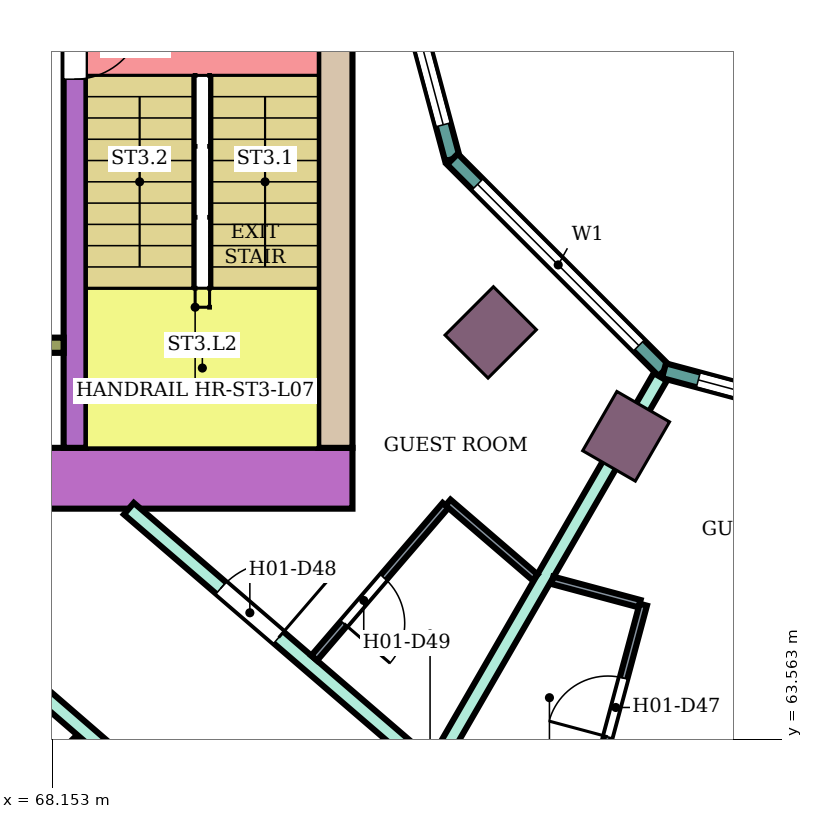
"""IFC4 building model, lengths in metres.
Left out: names, types, materials, properties, quantities, classifications, styles, units other than length and angle.
Written with IfcOpenShell. Run it as: python <this file> out.ifc"""

import sys

from ifc_helpers import new_model, si_unit, direction, frame, frame_2d, origin, origin_2d, place, context, subcontext, project, spatial, rectangle, extrude, element, fill, save


model = new_model("IFC4")
c1 = context("Model", 3, precision=1e-05, world=origin(), true_north=direction((0.0, 1.0)))
c2 = subcontext(c1, "Body", "Model", "MODEL_VIEW")
j1 = project(units=[si_unit("LENGTHUNIT", "METRE"), si_unit("PLANEANGLEUNIT", "RADIAN")], contexts=[c1])
p1 = place(None, origin())
s1 = spatial("IfcSite", under=j1, at=p1, CompositionType="ELEMENT")
p2 = place(p1, origin())
s2 = spatial("IfcBuilding", under=s1, at=p2, CompositionType="ELEMENT")
p3 = place(p2, frame((0.0, 0.0, 36.4)))
s3 = spatial("IfcBuildingStorey", under=s2, at=p3, CompositionType="ELEMENT", Elevation=36.4)
for number, where, z_axis, x_axis in (
    (1, (73.919, 68.919, 0.0), (0.0, 0.0, 1.0), (-0.707, -0.707, 0.0)),
    (2, (75.7, 67.552, 0.0), (0.0, 0.0, 1.0), (-0.5, -0.866, 0.0)),
):
    element("IfcColumn", number, at=place(p3, frame(where, z_axis=z_axis, x_axis=x_axis)), inside=s3, PredefinedType="COLUMN", context=c2, shape_type="SweptSolid", body=[
        extrude(rectangle(XDim=0.9, YDim=0.8, at=origin_2d()), origin(), (0.0, 0.0, 1.0), 3.8),
    ])
p4 = place(p3, frame((72.1, 67.0, 0.0), z_axis=(0.0, 0.0, 1.0), x_axis=(-1.0, 0.0, 0.0)))
e3 = element("IfcWall", 3, at=p4, inside=s3, PredefinedType="SHEAR", context=c2, shape_type="SweptSolid", body=[
    extrude(rectangle(XDim=14.7, YDim=0.8, at=frame_2d((7.35, 0.0))), origin(), (0.0, 0.0, 1.0), 3.48),
])
p5 = place(p4, frame((4.2, 0.0, 0.0)))
e4 = element("IfcOpeningElement", 4, at=p5, cuts=e3, PredefinedType="OPENING", context=c2, shape_type="SweptSolid", body=[
    extrude(rectangle(XDim=2.4, YDim=2.4, at=frame_2d((1.2, 1.2))), frame((0.0, 0.41, 0.0), z_axis=(0.0, -1.0, 0.0), x_axis=(1.0, 0.0, 0.0)), (0.0, 0.0, 1.0), 0.82),
])
p6 = place(p3, frame((71.875, 75.0, 0.0), z_axis=(0.0, 0.0, 1.0), x_axis=(0.0, -1.0, 0.0)))
e5 = element("IfcWall", 5, at=p6, inside=s3, PredefinedType="SHEAR", context=c2, shape_type="SweptSolid", body=[
    extrude(rectangle(XDim=7.6, YDim=0.45, at=frame_2d((3.8, 0.0))), origin(), (0.0, 0.0, 1.0), 3.48),
])
p7 = place(p3, frame((68.45, 75.0, 0.0), z_axis=(0.0, 0.0, 1.0), x_axis=(0.0, -1.0, 0.0)))
e6 = element("IfcWall", 6, at=p7, inside=s3, PredefinedType="SHEAR", context=c2, shape_type="SweptSolid", body=[
    extrude(rectangle(XDim=7.6, YDim=0.3, at=frame_2d((3.8, 0.0))), origin(), (0.0, 0.0, 1.0), 3.48),
])
p8 = place(p7, frame((1.85, 0.0, 0.0)))
e7 = element("IfcOpeningElement", 7, at=p8, cuts=e6, PredefinedType="OPENING", context=c2, shape_type="SweptSolid", body=[
    extrude(rectangle(XDim=0.9, YDim=2.1, at=frame_2d((0.45, 1.05))), frame((0.0, 0.16, 0.0), z_axis=(0.0, -1.0, 0.0), x_axis=(1.0, 0.0, 0.0)), (0.0, 0.0, 1.0), 0.32),
])
p9 = place(p3, frame((68.3, 68.75, 0.0), z_axis=(0.0, 0.0, 1.0), x_axis=(-1.0, 0.0, 0.0)))
e8 = element("IfcWall", 8, at=p9, inside=s3, PredefinedType="SHEAR", context=c2, shape_type="SweptSolid", body=[
    extrude(rectangle(XDim=4.65, YDim=0.2, at=frame_2d((2.325, 0.0))), origin(), (0.0, 0.0, 1.0), 3.48),
])
p10 = place(p3, frame((72.396, 75.0, 0.0), z_axis=(0.0, 0.0, 1.0), x_axis=(0.258789828301, -0.965933654434, 0.0)))
e9 = element("IfcWall", 9, at=p10, inside=s3, PredefinedType="NOTDEFINED", context=c2, shape_type="SweptSolid", body=[
    extrude(rectangle(XDim=3.936, YDim=0.2, at=frame_2d((1.968, 0.0))), origin(), (0.0, 0.0, 1.0), 3.8),
])
p11 = place(p10, frame((0.468, 0.0, 0.9)))
e10 = element("IfcOpeningElement", 10, at=p11, cuts=e9, PredefinedType="OPENING", context=c2, shape_type="SweptSolid", body=[
    extrude(rectangle(XDim=3.0, YDim=2.3, at=frame_2d((1.5, 1.15))), frame((0.0, 0.11, 0.0), z_axis=(0.0, -1.0, 0.0), x_axis=(1.0, 0.0, 0.0)), (0.0, 0.0, 1.0), 0.22),
])
p12 = place(p3, frame((73.415, 71.198, 0.0), z_axis=(0.0, 0.0, 1.0), x_axis=(0.707106781187, -0.707106781187, 0.0)))
e11 = element("IfcWall", 11, at=p12, inside=s3, PredefinedType="NOTDEFINED", context=c2, shape_type="SweptSolid", body=[
    extrude(rectangle(XDim=3.936, YDim=0.2, at=frame_2d((1.968, 0.0))), origin(), (0.0, 0.0, 1.0), 3.8),
])
p13 = place(p12, frame((0.468, 0.0, 0.9)))
e12 = element("IfcOpeningElement", 12, at=p13, cuts=e11, PredefinedType="OPENING", context=c2, shape_type="SweptSolid", body=[
    extrude(rectangle(XDim=3.0, YDim=2.3, at=frame_2d((1.5, 1.15))), frame((0.0, 0.11, 0.0), z_axis=(0.0, -1.0, 0.0), x_axis=(1.0, 0.0, 0.0)), (0.0, 0.0, 1.0), 0.22),
])
p14 = place(p3, frame((76.198, 68.415, 0.0), z_axis=(0.0, 0.0, 1.0), x_axis=(0.965933654434, -0.258789828301, 0.0)))
e13 = element("IfcWall", 13, at=p14, inside=s3, PredefinedType="NOTDEFINED", context=c2, shape_type="SweptSolid", body=[
    extrude(rectangle(XDim=3.936, YDim=0.2, at=frame_2d((1.968, 0.0))), origin(), (0.0, 0.0, 1.0), 3.8),
])
p15 = place(p14, frame((0.468, 0.0, 0.9)))
e14 = element("IfcOpeningElement", 14, at=p15, cuts=e13, PredefinedType="OPENING", context=c2, shape_type="SweptSolid", body=[
    extrude(rectangle(XDim=3.0, YDim=2.3, at=frame_2d((1.5, 1.15))), frame((0.0, 0.11, 0.0), z_axis=(0.0, -1.0, 0.0), x_axis=(1.0, 0.0, 0.0)), (0.0, 0.0, 1.0), 0.22),
])
p16 = place(p3, frame((63.592, 58.599, 0.0), z_axis=(0.0, 0.0, 1.0), x_axis=(0.707228748718, 0.706984792613, 0.0)))
e15 = element("IfcWall", 15, at=p16, inside=s3, PredefinedType="PARTITIONING", context=c2, shape_type="SweptSolid", body=[
    extrude(rectangle(XDim=7.005, YDim=0.2, at=frame_2d((3.503, 0.0))), origin(), (0.0, 0.0, 1.0), 3.35),
])
p17 = place(p3, frame((67.078, 64.968, 0.0), z_axis=(0.0, 0.0, 1.0), x_axis=(0.756371089567, -0.654142778656, 0.0)))
e16 = element("IfcWall", 16, at=p17, inside=s3, PredefinedType="PARTITIONING", context=c2, shape_type="SweptSolid", body=[
    extrude(rectangle(XDim=6.185, YDim=0.2, at=frame_2d((3.093, 0.0))), origin(), (0.0, 0.0, 1.0), 3.35),
])
p18 = place(p17, frame((4.755, 0.0, 0.0)))
e17 = element("IfcOpeningElement", 17, at=p18, cuts=e16, PredefinedType="OPENING", context=c2, shape_type="SweptSolid", body=[
    extrude(rectangle(XDim=1.0, YDim=2.1, at=frame_2d((0.5, 1.05))), frame((0.0, 0.11, 0.0), z_axis=(0.0, -1.0, 0.0), x_axis=(1.0, 0.0, 0.0)), (0.0, 0.0, 1.0), 0.22),
])
p19 = place(p3, frame((69.158, 66.6, 0.0), z_axis=(0.0, 0.0, 1.0), x_axis=(0.757976058094, -0.652282373943, 0.0)))
e18 = element("IfcWall", 18, at=p19, inside=s3, PredefinedType="PARTITIONING", context=c2, shape_type="SweptSolid", body=[
    extrude(rectangle(XDim=5.16, YDim=0.2, at=frame_2d((2.58, 0.0))), origin(), (0.0, 0.0, 1.0), 3.35),
])
p20 = place(p19, frame((1.6, 0.0, 0.0)))
e19 = element("IfcOpeningElement", 19, at=p20, cuts=e18, PredefinedType="OPENING", context=c2, shape_type="SweptSolid", body=[
    extrude(rectangle(XDim=1.0, YDim=2.1, at=frame_2d((0.5, 1.05))), frame((0.0, 0.11, 0.0), z_axis=(0.0, -1.0, 0.0), x_axis=(1.0, 0.0, 0.0)), (0.0, 0.0, 1.0), 0.22),
])
p21 = place(p3, frame((73.171, 63.177, 0.0), z_axis=(0.0, 0.0, 1.0), x_axis=(0.500257106344, 0.865876912472, 0.0)))
e20 = element("IfcWall", 20, at=p21, inside=s3, PredefinedType="PARTITIONING", context=c2, shape_type="SweptSolid", body=[
    extrude(rectangle(XDim=5.955, YDim=0.2, at=frame_2d((2.978, 0.0))), origin(), (0.0, 0.0, 1.0), 3.35),
])
p22 = place(p3, frame((71.596, 64.635, 0.0), z_axis=(0.0, 0.0, 1.0), x_axis=(0.652285007511, 0.757973791748, 0.0)))
e21 = element("IfcWall", 21, at=p22, inside=s3, PredefinedType="PARTITIONING", context=c2, shape_type="SweptSolid", body=[
    extrude(rectangle(XDim=2.65, YDim=0.1, at=frame_2d((1.325, 0.0))), origin(), (0.0, 0.0, 1.0), 3.35),
])
p23 = place(p22, frame((0.6, 0.0, 0.0)))
e22 = element("IfcOpeningElement", 22, at=p23, cuts=e21, PredefinedType="OPENING", context=c2, shape_type="SweptSolid", body=[
    extrude(rectangle(XDim=0.8, YDim=2.1, at=frame_2d((0.4, 1.05))), frame((0.0, 0.06, 0.0), z_axis=(0.0, -1.0, 0.0), x_axis=(1.0, 0.0, 0.0)), (0.0, 0.0, 1.0), 0.12),
])
p24 = place(p3, frame((73.357, 66.681, 0.0), z_axis=(0.0, 0.0, 1.0), x_axis=(0.758263469747, -0.651948242154, 0.0)))
e23 = element("IfcWall", 23, at=p24, inside=s3, PredefinedType="PARTITIONING", context=c2, shape_type="SweptSolid", body=[
    extrude(rectangle(XDim=1.511, YDim=0.1, at=frame_2d((0.755, 0.0))), origin(), (0.0, 0.0, 1.0), 3.35),
])
p25 = place(p3, frame((74.729, 65.657, 0.0), z_axis=(0.0, 0.0, 1.0), x_axis=(0.965948051503, -0.258736085224, 0.0)))
e24 = element("IfcWall", 24, at=p25, inside=s3, PredefinedType="PARTITIONING", context=c2, shape_type="SweptSolid", body=[
    extrude(rectangle(XDim=1.189, YDim=0.1, at=frame_2d((0.594, 0.0))), origin(), (0.0, 0.0, 1.0), 3.35),
])
p26 = place(p3, frame((75.227, 62.729, 0.0), z_axis=(0.0, 0.0, 1.0), x_axis=(0.258945475746, 0.965891940432, 0.0)))
e25 = element("IfcWall", 25, at=p26, inside=s3, PredefinedType="PARTITIONING", context=c2, shape_type="SweptSolid", body=[
    extrude(rectangle(XDim=2.7, YDim=0.1, at=frame_2d((1.35, 0.0))), origin(), (0.0, 0.0, 1.0), 3.35),
])
p27 = place(p26, frame((0.9, 0.0, 0.0)))
e26 = element("IfcOpeningElement", 26, at=p27, cuts=e25, PredefinedType="OPENING", context=c2, shape_type="SweptSolid", body=[
    extrude(rectangle(XDim=0.8, YDim=2.1, at=frame_2d((0.4, 1.05))), frame((0.0, 0.06, 0.0), z_axis=(0.0, -1.0, 0.0), x_axis=(1.0, 0.0, 0.0)), (0.0, 0.0, 1.0), 0.12),
])
p28 = place(p11, origin())
e27 = element("IfcWindow", 27, at=p28, inside=s3, PartitioningType="SINGLE_PANEL", PredefinedType="WINDOW", context=c2, shape_type="SweptSolid", body=[
    extrude(rectangle(XDim=3.0, YDim=2.3, at=frame_2d((1.5, 1.15))), frame((0.0, 0.03, 0.0), z_axis=(0.0, -1.0, 0.0), x_axis=(1.0, 0.0, 0.0)), (0.0, 0.0, 1.0), 0.06),
])
fill(e10, e27)
p29 = place(p13, origin())
e28 = element("IfcWindow", 28, at=p29, inside=s3, PartitioningType="SINGLE_PANEL", PredefinedType="WINDOW", context=c2, shape_type="SweptSolid", body=[
    extrude(rectangle(XDim=3.0, YDim=2.3, at=frame_2d((1.5, 1.15))), frame((0.0, 0.03, 0.0), z_axis=(0.0, -1.0, 0.0), x_axis=(1.0, 0.0, 0.0)), (0.0, 0.0, 1.0), 0.06),
])
fill(e12, e28)
p30 = place(p15, origin())
e29 = element("IfcWindow", 29, at=p30, inside=s3, PartitioningType="SINGLE_PANEL", PredefinedType="WINDOW", context=c2, shape_type="SweptSolid", body=[
    extrude(rectangle(XDim=3.0, YDim=2.3, at=frame_2d((1.5, 1.15))), frame((0.0, 0.03, 0.0), z_axis=(0.0, -1.0, 0.0), x_axis=(1.0, 0.0, 0.0)), (0.0, 0.0, 1.0), 0.06),
])
fill(e14, e29)
p31 = place(p27, origin())
e30 = element("IfcDoor", 30, at=p31, inside=s3, OperationType="SINGLE_SWING_LEFT", PredefinedType="DOOR", context=c2, shape_type="SweptSolid", body=[
    extrude(rectangle(XDim=0.8, YDim=2.1, at=frame_2d((0.4, 1.05))), frame((0.0, 0.025, 0.0), z_axis=(0.0, -1.0, 0.0), x_axis=(1.0, 0.0, 0.0)), (0.0, 0.0, 1.0), 0.05),
])
fill(e26, e30)
p32 = place(p20, origin())
e31 = element("IfcDoor", 31, at=p32, inside=s3, OperationType="SINGLE_SWING_RIGHT", PredefinedType="DOOR", context=c2, shape_type="SweptSolid", body=[
    extrude(rectangle(XDim=1.0, YDim=2.1, at=frame_2d((0.5, 1.05))), frame((0.0, 0.025, 0.0), z_axis=(0.0, -1.0, 0.0), x_axis=(1.0, 0.0, 0.0)), (0.0, 0.0, 1.0), 0.05),
])
fill(e19, e31)
p33 = place(p23, frame((0.8, 0.0, 0.0), z_axis=(0.0, 0.0, 1.0), x_axis=(-1.0, 0.0, 0.0)))
e32 = element("IfcDoor", 32, at=p33, inside=s3, OperationType="SINGLE_SWING_RIGHT", PredefinedType="DOOR", context=c2, shape_type="SweptSolid", body=[
    extrude(rectangle(XDim=0.8, YDim=2.1, at=frame_2d((0.4, 1.05))), frame((0.0, 0.025, 0.0), z_axis=(0.0, -1.0, 0.0), x_axis=(1.0, 0.0, 0.0)), (0.0, 0.0, 1.0), 0.05),
])
fill(e22, e32)
p34 = place(p8, origin())
e33 = element("IfcDoor", 33, at=p34, inside=s3, OperationType="SINGLE_SWING_LEFT", PredefinedType="DOOR", context=c2, shape_type="SweptSolid", body=[
    extrude(rectangle(XDim=0.9, YDim=2.1, at=frame_2d((0.45, 1.05))), frame((0.0, 0.025, 0.0), z_axis=(0.0, -1.0, 0.0), x_axis=(1.0, 0.0, 0.0)), (0.0, 0.0, 1.0), 0.05),
])
fill(e7, e33)
save(model, sys.argv[1])
